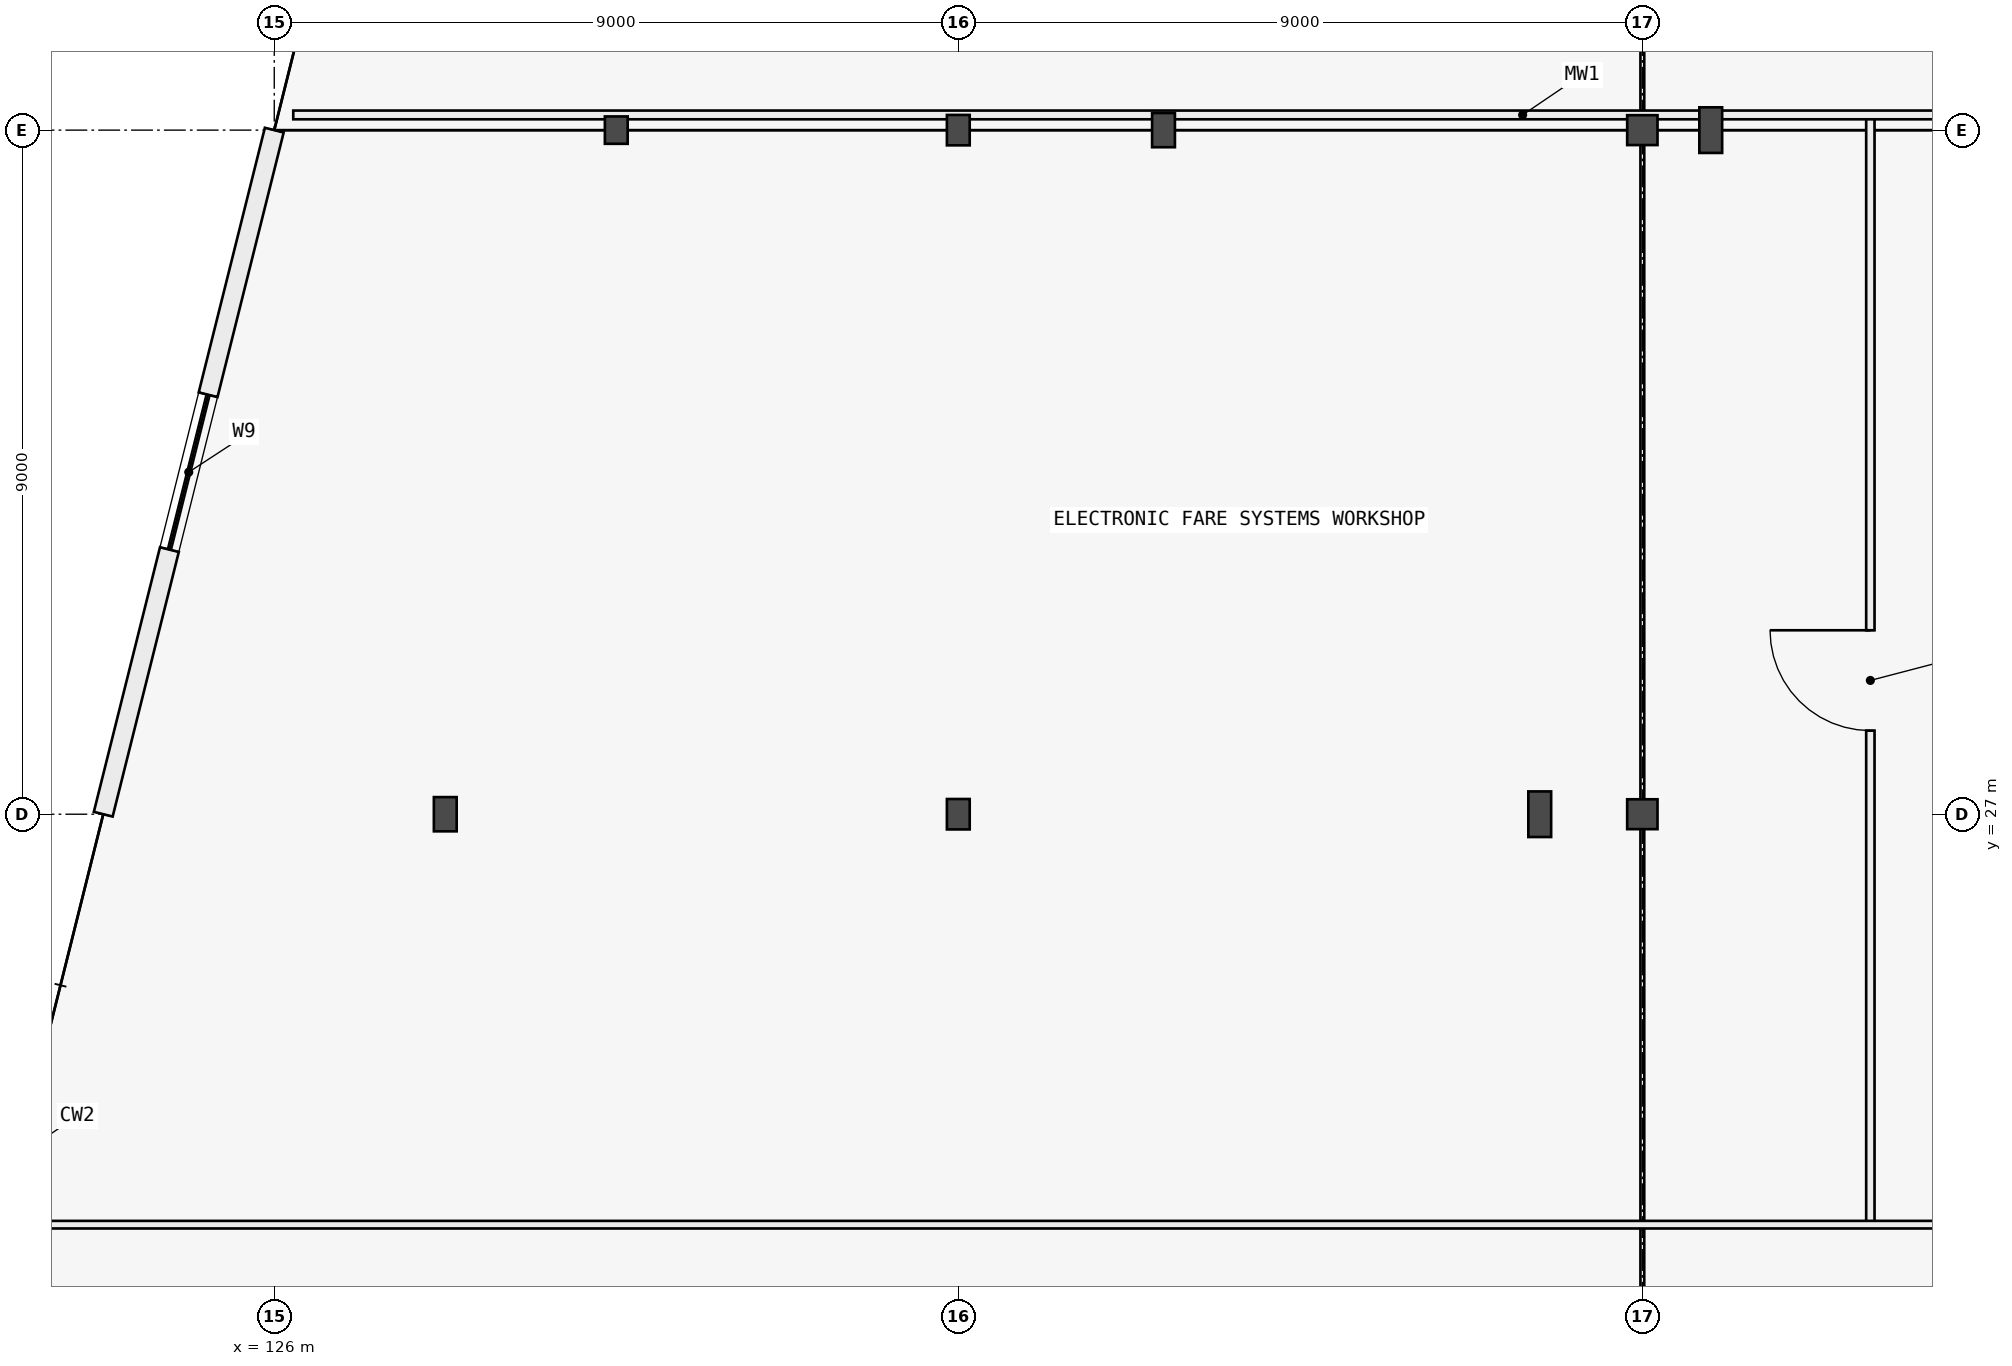
"""IFC4 building model, lengths in metres.
Left out: names, types, materials, properties, quantities, classifications, styles, units other than length and angle.
Written with IfcOpenShell. Run it as: python <this file> out.ifc"""

import sys

from ifc_helpers import new_model, si_unit, direction, frame, frame_2d, origin, origin_2d, place, context, subcontext, project, spatial, rectangle, i_section, extrude, element, fill, save


model = new_model("IFC4")
c1 = context("Model", 3, precision=1e-05, world=origin(), true_north=direction((0.0, 1.0)))
c2 = subcontext(c1, "Body", "Model", "MODEL_VIEW")
j1 = project(units=[si_unit("LENGTHUNIT", "METRE"), si_unit("PLANEANGLEUNIT", "RADIAN")], contexts=[c1])
p1 = place(None, origin())
s1 = spatial("IfcSite", under=j1, at=p1, CompositionType="ELEMENT")
p2 = place(p1, origin())
s2 = spatial("IfcBuilding", under=s1, at=p2, CompositionType="ELEMENT")
p3 = place(p2, frame((0.0, 0.0, 8.4)))
s3 = spatial("IfcBuildingStorey", under=s2, at=p3, CompositionType="ELEMENT", Elevation=8.4)
p4 = place(p3, frame((128.25, 27.0, 0.0), z_axis=(0.0, 0.0, 1.0), x_axis=(1.0, 0.0, 0.0)))
e1 = element("IfcColumn", 1, at=p4, inside=s3, PredefinedType="COLUMN", context=c2, shape_type="SweptSolid", body=[
    extrude(i_section(OverallWidth=0.3, OverallDepth=0.45, WebThickness=0.014, FlangeThickness=0.026, FilletRadius=0.027, at=origin_2d()), origin(), (0.0, 0.0, 1.0), 4.2),
])
p5 = place(p3, frame((135.0, 27.0, 0.0), z_axis=(0.0, 0.0, 1.0), x_axis=(1.0, 0.0, 0.0)))
e2 = element("IfcColumn", 2, at=p5, inside=s3, PredefinedType="COLUMN", context=c2, shape_type="SweptSolid", body=[
    extrude(i_section(OverallWidth=0.3, OverallDepth=0.4, WebThickness=0.013, FlangeThickness=0.024, FilletRadius=0.027, at=origin_2d()), origin(), (0.0, 0.0, 1.0), 4.2),
])
p6 = place(p3, frame((142.65, 27.0, 0.0), z_axis=(0.0, 0.0, 1.0), x_axis=(1.0, 0.0, 0.0)))
e3 = element("IfcColumn", 3, at=p6, inside=s3, PredefinedType="COLUMN", context=c2, shape_type="SweptSolid", body=[
    extrude(i_section(OverallWidth=0.3, OverallDepth=0.6, WebThickness=0.015, FlangeThickness=0.03, FilletRadius=0.027, at=origin_2d()), origin(), (0.0, 0.0, 1.0), 4.2),
])
p7 = place(p3, frame((144.0, 27.0, 0.0), z_axis=(0.0, 0.0, 1.0), x_axis=(1.0, 0.0, 0.0)))
e4 = element("IfcColumn", 4, at=p7, inside=s3, PredefinedType="COLUMN", context=c2, shape_type="SweptSolid", body=[
    extrude(i_section(OverallWidth=0.399, OverallDepth=0.393, WebThickness=0.018, FlangeThickness=0.028, FilletRadius=0.015, at=origin_2d()), origin(), (0.0, 0.0, 1.0), 4.2),
])
p8 = place(p3, frame((130.5, 36.0, 0.0), z_axis=(0.0, 0.0, 1.0), x_axis=(1.0, 0.0, 0.0)))
e5 = element("IfcColumn", 5, at=p8, inside=s3, PredefinedType="COLUMN", context=c2, shape_type="SweptSolid", body=[
    extrude(i_section(OverallWidth=0.3, OverallDepth=0.36, WebThickness=0.012, FlangeThickness=0.022, FilletRadius=0.027, at=origin_2d()), origin(), (0.0, 0.0, 1.0), 4.2),
])
p9 = place(p3, frame((135.0, 36.0, 0.0), z_axis=(0.0, 0.0, 1.0), x_axis=(1.0, 0.0, 0.0)))
e6 = element("IfcColumn", 6, at=p9, inside=s3, PredefinedType="COLUMN", context=c2, shape_type="SweptSolid", body=[
    extrude(i_section(OverallWidth=0.3, OverallDepth=0.4, WebThickness=0.013, FlangeThickness=0.024, FilletRadius=0.027, at=origin_2d()), origin(), (0.0, 0.0, 1.0), 4.2),
])
p10 = place(p3, frame((137.7, 36.0, 0.0), z_axis=(0.0, 0.0, 1.0), x_axis=(1.0, 0.0, 0.0)))
e7 = element("IfcColumn", 7, at=p10, inside=s3, PredefinedType="COLUMN", context=c2, shape_type="SweptSolid", body=[
    extrude(i_section(OverallWidth=0.3, OverallDepth=0.45, WebThickness=0.014, FlangeThickness=0.026, FilletRadius=0.027, at=origin_2d()), origin(), (0.0, 0.0, 1.0), 4.2),
])
p11 = place(p3, frame((144.0, 36.0, 0.0), z_axis=(0.0, 0.0, 1.0), x_axis=(1.0, 0.0, 0.0)))
e8 = element("IfcColumn", 8, at=p11, inside=s3, PredefinedType="COLUMN", context=c2, shape_type="SweptSolid", body=[
    extrude(i_section(OverallWidth=0.399, OverallDepth=0.393, WebThickness=0.018, FlangeThickness=0.028, FilletRadius=0.015, at=origin_2d()), origin(), (0.0, 0.0, 1.0), 4.2),
])
p12 = place(p3, frame((144.9, 36.0, 0.0), z_axis=(0.0, 0.0, 1.0), x_axis=(1.0, 0.0, 0.0)))
e9 = element("IfcColumn", 9, at=p12, inside=s3, PredefinedType="COLUMN", context=c2, shape_type="SweptSolid", body=[
    extrude(i_section(OverallWidth=0.3, OverallDepth=0.6, WebThickness=0.015, FlangeThickness=0.03, FilletRadius=0.027, at=origin_2d()), origin(), (0.0, 0.0, 1.0), 4.2),
])
p13 = place(p3, frame((123.75, 27.0, 0.0), z_axis=(0.0, 0.0, 1.0), x_axis=(0.242535625036, 0.970142500145, 0.0)))
e10 = element("IfcWall", 10, at=p13, inside=s3, PredefinedType="POLYGONAL", context=c2, shape_type="SweptSolid", body=[
    extrude(rectangle(XDim=9.277, YDim=0.255, at=frame_2d((4.639, 0.0))), origin(), (0.0, 0.0, 1.0), 3.935),
])
p14 = place(p13, frame((3.588, 0.0, 0.95)))
e11 = element("IfcOpeningElement", 11, at=p14, cuts=e10, PredefinedType="OPENING", context=c2, shape_type="SweptSolid", body=[
    extrude(rectangle(XDim=2.1, YDim=1.7, at=frame_2d((1.05, 0.85))), frame((0.0, 0.137, 0.0), z_axis=(0.0, -1.0, 0.0), x_axis=(1.0, 0.0, 0.0)), (0.0, 0.0, 1.0), 0.275),
])
p15 = place(p3, frame((147.0, 21.6, 0.0), z_axis=(0.0, 0.0, 1.0), x_axis=(0.0, 1.0, 0.0)))
e12 = element("IfcWall", 12, at=p15, inside=s3, PredefinedType="PARTITIONING", context=c2, shape_type="SweptSolid", body=[
    extrude(rectangle(XDim=14.6, YDim=0.11, at=frame_2d((7.3, 0.0))), origin(), (0.0, 0.0, 1.0), 3.935),
])
p16 = place(p15, frame((6.5, 0.0, 0.0)))
e13 = element("IfcOpeningElement", 13, at=p16, cuts=e12, PredefinedType="OPENING", context=c2, shape_type="SweptSolid", body=[
    extrude(rectangle(XDim=1.32, YDim=2.2, at=frame_2d((0.66, 1.1))), frame((0.0, 0.065, 0.0), z_axis=(0.0, -1.0, 0.0), x_axis=(1.0, 0.0, 0.0)), (0.0, 0.0, 1.0), 0.13),
])
p17 = place(p3, frame((122.6, 21.6, 0.0), z_axis=(0.0, 0.0, 1.0), x_axis=(1.0, 0.0, 0.0)))
e14 = element("IfcWall", 14, at=p17, inside=s3, PredefinedType="PARTITIONING", context=c2, shape_type="SweptSolid", body=[
    extrude(rectangle(XDim=27.6, YDim=0.1, at=frame_2d((13.8, 0.0))), origin(), (0.0, 0.0, 1.0), 3.935),
])
p18 = place(p3, frame((126.25, 36.2, 0.0), z_axis=(0.0, 0.0, 1.0), x_axis=(1.0, 0.0, 0.0)))
e15 = element("IfcWall", 15, at=p18, inside=s3, PredefinedType="MOVABLE", context=c2, shape_type="SweptSolid", body=[
    extrude(rectangle(XDim=32.35, YDim=0.115, at=frame_2d((16.175, 0.0))), origin(), (0.0, 0.0, 1.0), 3.41),
])
p19 = place(p14, origin())
e16 = element("IfcWindow", 16, at=p19, inside=s3, PartitioningType="SINGLE_PANEL", PredefinedType="WINDOW", context=c2, shape_type="SweptSolid", body=[
    extrude(rectangle(XDim=2.1, YDim=1.7, at=frame_2d((1.05, 0.85))), frame((0.0, 0.03, 0.0), z_axis=(0.0, -1.0, 0.0), x_axis=(1.0, 0.0, 0.0)), (0.0, 0.0, 1.0), 0.06),
])
fill(e11, e16)
p20 = place(p16, origin())
e17 = element("IfcDoor", 17, at=p20, inside=s3, OperationType="SINGLE_SWING_RIGHT", PredefinedType="DOOR", context=c2, shape_type="SweptSolid", body=[
    extrude(rectangle(XDim=1.32, YDim=2.2, at=frame_2d((0.66, 1.1))), frame((0.0, 0.025, 0.0), z_axis=(0.0, -1.0, 0.0), x_axis=(1.0, 0.0, 0.0)), (0.0, 0.0, 1.0), 0.05),
])
fill(e13, e17)
save(model, sys.argv[1])
